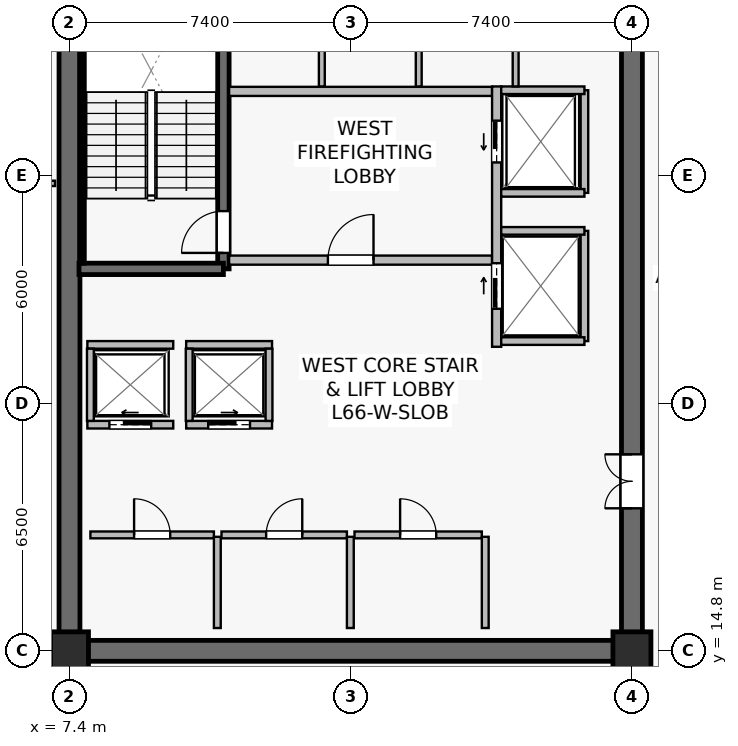
"""IFC4 building model, lengths in metres.
Left out: names, types, materials, properties, quantities, classifications, styles, units other than length and angle.
Written with IfcOpenShell. Run it as: python <this file> out.ifc"""

import sys

from ifc_helpers import new_model, si_unit, direction, frame, frame_2d, origin, origin_2d, place, context, subcontext, project, spatial, rectangle, extrude, source, transform, mapped, element, fill, save


model = new_model("IFC4")
c1 = context("Model", 3, precision=1e-05, world=origin(), true_north=direction((0.0, 1.0)))
c2 = subcontext(c1, "Body", "Model", "MODEL_VIEW")
j1 = project(units=[si_unit("LENGTHUNIT", "METRE"), si_unit("PLANEANGLEUNIT", "RADIAN")], contexts=[c1])
p1 = place(None, origin())
s1 = spatial("IfcSite", under=j1, at=p1, CompositionType="ELEMENT")
p2 = place(p1, origin())
s2 = spatial("IfcBuilding", under=s1, at=p2, CompositionType="ELEMENT")
p3 = place(p2, frame((0.0, 0.0, 275.2)))
s3 = spatial("IfcBuildingStorey", under=s2, at=p3, CompositionType="ELEMENT", Elevation=275.2)
p4 = place(p3, frame((7.125, 14.8, 0.0), z_axis=(0.0, 0.0, 1.0), x_axis=(1.0, 0.0, 0.0)))
e1 = element("IfcWall", 1, at=p4, inside=s3, PredefinedType="SHEAR", context=c2, shape_type="SweptSolid", body=[
    extrude(rectangle(XDim=15.35, YDim=0.55, at=frame_2d((7.675, 0.0))), origin(), (0.0, 0.0, 1.0), 3.8),
])
p5 = place(p3, frame((7.4, 15.075, 0.0), z_axis=(0.0, 0.0, 1.0), x_axis=(0.0, 1.0, 0.0)))
e2 = element("IfcWall", 2, at=p5, inside=s3, PredefinedType="SHEAR", context=c2, shape_type="SweptSolid", body=[
    extrude(rectangle(XDim=18.45, YDim=0.55, at=frame_2d((9.225, 0.0))), origin(), (0.0, 0.0, 1.0), 3.8),
])
p6 = place(p3, frame((22.2, 15.075, 0.0), z_axis=(0.0, 0.0, 1.0), x_axis=(0.0, 1.0, 0.0)))
e3 = element("IfcWall", 3, at=p6, inside=s3, PredefinedType="SHEAR", context=c2, shape_type="SweptSolid", body=[
    extrude(rectangle(XDim=18.45, YDim=0.55, at=frame_2d((9.225, 0.0))), origin(), (0.0, 0.0, 1.0), 3.8),
])
p7 = place(p6, frame((3.475, 0.0, 0.0)))
e4 = element("IfcOpeningElement", 4, at=p7, cuts=e3, PredefinedType="OPENING", context=c2, shape_type="SweptSolid", body=[
    extrude(rectangle(XDim=1.42, YDim=2.2, at=frame_2d((0.71, 1.1))), frame((0.0, 0.285, 0.0), z_axis=(0.0, -1.0, 0.0), x_axis=(1.0, 0.0, 0.0)), (0.0, 0.0, 1.0), 0.57),
])
p8 = place(p3, frame((11.45, 24.85, 0.0), z_axis=(0.0, 0.0, 1.0), x_axis=(0.0, 1.0, 0.0)))
e5 = element("IfcWall", 5, at=p8, inside=s3, PredefinedType="SHEAR", context=c2, shape_type="SweptSolid", body=[
    extrude(rectangle(XDim=8.63, YDim=0.3, at=frame_2d((4.315, 0.0))), origin(), (0.0, 0.0, 1.0), 3.8),
])
p9 = place(p8, frame((0.42, 0.0, 0.0)))
e6 = element("IfcOpeningElement", 6, at=p9, cuts=e5, PredefinedType="OPENING", context=c2, shape_type="SweptSolid", body=[
    extrude(rectangle(XDim=1.1, YDim=2.15, at=frame_2d((0.55, 1.075))), frame((0.0, 0.16, 0.0), z_axis=(0.0, -1.0, 0.0), x_axis=(1.0, 0.0, 0.0)), (0.0, 0.0, 1.0), 0.32),
])
p10 = place(p3, frame((7.65, 24.85, 0.0), z_axis=(0.0, 0.0, 1.0), x_axis=(1.0, 0.0, 0.0)))
e7 = element("IfcWall", 7, at=p10, inside=s3, PredefinedType="SHEAR", context=c2, shape_type="SweptSolid", body=[
    extrude(rectangle(XDim=3.8, YDim=0.3, at=frame_2d((1.9, 0.0))), origin(), (0.0, 0.0, 1.0), 3.8),
])
p11 = place(p3, frame((7.73, 25.0, 0.0), z_axis=(0.0, 0.0, 1.0), x_axis=(0.0, 1.0, 0.0)))
e8 = element("IfcWall", 8, at=p11, inside=s3, PredefinedType="SOLIDWALL", context=c2, shape_type="SweptSolid", body=[
    extrude(rectangle(XDim=8.32, YDim=0.12, at=frame_2d((4.16, 0.0))), origin(), (0.0, 0.0, 1.0), 3.8),
])
m1 = source(origin(), c2, "Body", "SweptSolid", [
    extrude(rectangle(XDim=1.0, YDim=1.0, at=origin_2d()), origin(), (0.0, 0.0, 1.0), 4.1),
])
for number, where, z_axis, x_axis in (
    (9, (7.4, 14.8, 0.0), (0.0, 0.0, 1.0), (1.0, 0.0, 0.0)),
    (10, (22.2, 14.8, 0.0), (0.0, 0.0, 1.0), (1.0, 0.0, 0.0)),
):
    element("IfcColumn", number, at=place(p3, frame(where, z_axis=z_axis, x_axis=x_axis)), inside=s3, PredefinedType="COLUMN", context=c2, shape_type="MappedRepresentation", body=[
        mapped(m1, transform((0.0, 0.0, 0.0), scale=1.0)),
    ])
p12 = place(p3, frame((11.6, 25.08, 0.0), z_axis=(0.0, 0.0, 1.0), x_axis=(1.0, 0.0, 0.0)))
e11 = element("IfcWall", 11, at=p12, inside=s3, PredefinedType="SOLIDWALL", context=c2, shape_type="SweptSolid", body=[
    extrude(rectangle(XDim=6.92, YDim=0.24, at=frame_2d((3.46, 0.0))), origin(), (0.0, 0.0, 1.0), 3.197),
])
p13 = place(p12, frame((2.6, 0.0, 0.0)))
e12 = element("IfcOpeningElement", 12, at=p13, cuts=e11, PredefinedType="OPENING", context=c2, shape_type="SweptSolid", body=[
    extrude(rectangle(XDim=1.2, YDim=2.16, at=frame_2d((0.6, 1.08))), frame((0.0, 0.13, 0.0), z_axis=(0.0, -1.0, 0.0), x_axis=(1.0, 0.0, 0.0)), (0.0, 0.0, 1.0), 0.26),
])
p14 = place(p3, frame((11.6, 29.52, 0.0), z_axis=(0.0, 0.0, 1.0), x_axis=(1.0, 0.0, 0.0)))
e13 = element("IfcWall", 13, at=p14, inside=s3, PredefinedType="SOLIDWALL", context=c2, shape_type="SweptSolid", body=[
    extrude(rectangle(XDim=6.92, YDim=0.24, at=frame_2d((3.46, 0.0))), origin(), (0.0, 0.0, 1.0), 3.197),
])
p15 = place(p3, frame((18.64, 22.8, 0.0), z_axis=(0.0, 0.0, 1.0), x_axis=(0.0, 1.0, 0.0)))
e14 = element("IfcWall", 14, at=p15, inside=s3, PredefinedType="SOLIDWALL", context=c2, shape_type="SweptSolid", body=[
    extrude(rectangle(XDim=6.85, YDim=0.24, at=frame_2d((3.425, 0.0))), origin(), (0.0, 0.0, 1.0), 2.935),
])
p16 = place(p15, frame((4.85, 0.0, 0.0)))
e15 = element("IfcOpeningElement", 15, at=p16, cuts=e14, PredefinedType="OPENING", context=c2, shape_type="SweptSolid", body=[
    extrude(rectangle(XDim=1.1, YDim=2.22, at=frame_2d((0.55, 1.11))), frame((0.0, 0.13, 0.0), z_axis=(0.0, -1.0, 0.0), x_axis=(1.0, 0.0, 0.0)), (0.0, 0.0, 1.0), 0.26),
])
p17 = place(p15, frame((1.0, 0.0, 0.0)))
e16 = element("IfcOpeningElement", 16, at=p17, cuts=e14, PredefinedType="OPENING", context=c2, shape_type="SweptSolid", body=[
    extrude(rectangle(XDim=1.2, YDim=2.22, at=frame_2d((0.6, 1.11))), frame((0.0, 0.13, 0.0), z_axis=(0.0, -1.0, 0.0), x_axis=(1.0, 0.0, 0.0)), (0.0, 0.0, 1.0), 0.26),
])
p18 = place(p3, frame((7.87, 20.75, 0.0), z_axis=(0.0, 0.0, 1.0), x_axis=(1.0, 0.0, 0.0)))
e17 = element("IfcWall", 17, at=p18, inside=s3, PredefinedType="SOLIDWALL", context=c2, shape_type="SweptSolid", body=[
    extrude(rectangle(XDim=2.26, YDim=0.2, at=frame_2d((1.13, 0.0))), origin(), (0.0, 0.0, 1.0), 3.8),
])
p19 = place(p18, frame((0.58, 0.0, 0.0)))
e18 = element("IfcOpeningElement", 18, at=p19, cuts=e17, PredefinedType="OPENING", context=c2, shape_type="SweptSolid", body=[
    extrude(rectangle(XDim=1.1, YDim=2.22, at=frame_2d((0.55, 1.11))), frame((0.0, 0.11, 0.0), z_axis=(0.0, -1.0, 0.0), x_axis=(1.0, 0.0, 0.0)), (0.0, 0.0, 1.0), 0.22),
])
p20 = place(p3, frame((7.87, 22.85, 0.0), z_axis=(0.0, 0.0, 1.0), x_axis=(1.0, 0.0, 0.0)))
e19 = element("IfcWall", 19, at=p20, inside=s3, PredefinedType="SOLIDWALL", context=c2, shape_type="SweptSolid", body=[
    extrude(rectangle(XDim=2.26, YDim=0.2, at=frame_2d((1.13, 0.0))), origin(), (0.0, 0.0, 1.0), 3.8),
])
p21 = place(p3, frame((7.95, 20.85, 0.0), z_axis=(0.0, 0.0, 1.0), x_axis=(0.0, 1.0, 0.0)))
e20 = element("IfcWall", 20, at=p21, inside=s3, PredefinedType="SOLIDWALL", context=c2, shape_type="SweptSolid", body=[
    extrude(rectangle(XDim=1.9, YDim=0.18, at=frame_2d((0.95, 0.0))), origin(), (0.0, 0.0, 1.0), 3.8),
])
p22 = place(p3, frame((10.47, 20.75, 0.0), z_axis=(0.0, 0.0, 1.0), x_axis=(1.0, 0.0, 0.0)))
e21 = element("IfcWall", 21, at=p22, inside=s3, PredefinedType="SOLIDWALL", context=c2, shape_type="SweptSolid", body=[
    extrude(rectangle(XDim=2.26, YDim=0.2, at=frame_2d((1.13, 0.0))), origin(), (0.0, 0.0, 1.0), 3.8),
])
p23 = place(p22, frame((0.58, 0.0, 0.0)))
e22 = element("IfcOpeningElement", 22, at=p23, cuts=e21, PredefinedType="OPENING", context=c2, shape_type="SweptSolid", body=[
    extrude(rectangle(XDim=1.1, YDim=2.22, at=frame_2d((0.55, 1.11))), frame((0.0, 0.11, 0.0), z_axis=(0.0, -1.0, 0.0), x_axis=(1.0, 0.0, 0.0)), (0.0, 0.0, 1.0), 0.22),
])
p24 = place(p3, frame((10.47, 22.85, 0.0), z_axis=(0.0, 0.0, 1.0), x_axis=(1.0, 0.0, 0.0)))
e23 = element("IfcWall", 23, at=p24, inside=s3, PredefinedType="SOLIDWALL", context=c2, shape_type="SweptSolid", body=[
    extrude(rectangle(XDim=2.26, YDim=0.2, at=frame_2d((1.13, 0.0))), origin(), (0.0, 0.0, 1.0), 3.8),
])
for number, where, z_axis, x_axis in (
    (24, (10.55, 20.85, 0.0), (0.0, 0.0, 1.0), (0.0, 1.0, 0.0)),
    (25, (12.65, 20.85, 0.0), (0.0, 0.0, 1.0), (0.0, 1.0, 0.0)),
):
    element("IfcWall", number, at=place(p3, frame(where, z_axis=z_axis, x_axis=x_axis)), inside=s3, PredefinedType="SOLIDWALL", context=c2, shape_type="SweptSolid", body=[
        extrude(rectangle(XDim=1.9, YDim=0.18, at=frame_2d((0.95, 0.0))), origin(), (0.0, 0.0, 1.0), 3.8),
    ])
p25 = place(p3, frame((20.95, 26.85, 0.0), z_axis=(0.0, 0.0, 1.0), x_axis=(0.0, 1.0, 0.0)))
e26 = element("IfcWall", 26, at=p25, inside=s3, PredefinedType="SOLIDWALL", context=c2, shape_type="SweptSolid", body=[
    extrude(rectangle(XDim=2.7, YDim=0.2, at=frame_2d((1.35, 0.0))), origin(), (0.0, 0.0, 1.0), 3.8),
])
p26 = place(p3, frame((18.76, 29.55, 0.0), z_axis=(0.0, 0.0, 1.0), x_axis=(1.0, 0.0, 0.0)))
e27 = element("IfcWall", 27, at=p26, inside=s3, PredefinedType="SOLIDWALL", context=c2, shape_type="SweptSolid", body=[
    extrude(rectangle(XDim=2.19, YDim=0.2, at=frame_2d((1.095, 0.0))), origin(), (0.0, 0.0, 1.0), 3.8),
])
p27 = place(p3, frame((18.76, 26.85, 0.0), z_axis=(0.0, 0.0, 1.0), x_axis=(1.0, 0.0, 0.0)))
e28 = element("IfcWall", 28, at=p27, inside=s3, PredefinedType="SOLIDWALL", context=c2, shape_type="SweptSolid", body=[
    extrude(rectangle(XDim=2.19, YDim=0.2, at=frame_2d((1.095, 0.0))), origin(), (0.0, 0.0, 1.0), 3.197),
])
p28 = place(p3, frame((20.95, 22.95, 0.0), z_axis=(0.0, 0.0, 1.0), x_axis=(0.0, 1.0, 0.0)))
e29 = element("IfcWall", 29, at=p28, inside=s3, PredefinedType="SOLIDWALL", context=c2, shape_type="SweptSolid", body=[
    extrude(rectangle(XDim=2.9, YDim=0.2, at=frame_2d((1.45, 0.0))), origin(), (0.0, 0.0, 1.0), 2.935),
])
for number, where, z_axis, x_axis in (
    (30, (18.76, 25.85, 0.0), (0.0, 0.0, 1.0), (1.0, 0.0, 0.0)),
    (31, (18.76, 22.95, 0.0), (0.0, 0.0, 1.0), (1.0, 0.0, 0.0)),
):
    element("IfcWall", number, at=place(p3, frame(where, z_axis=z_axis, x_axis=x_axis)), inside=s3, PredefinedType="SOLIDWALL", context=c2, shape_type="SweptSolid", body=[
        extrude(rectangle(XDim=2.19, YDim=0.2, at=frame_2d((1.095, 0.0))), origin(), (0.0, 0.0, 1.0), 3.8),
    ])
p29 = place(p3, frame((7.95, 17.85, 0.0), z_axis=(0.0, 0.0, 1.0), x_axis=(1.0, 0.0, 0.0)))
e32 = element("IfcWall", 32, at=p29, inside=s3, PredefinedType="SOLIDWALL", context=c2, shape_type="SweptSolid", body=[
    extrude(rectangle(XDim=3.25, YDim=0.18, at=frame_2d((1.625, 0.0))), origin(), (0.0, 0.0, 1.0), 3.8),
])
p30 = place(p29, frame((1.15, 0.0, 0.0)))
e33 = element("IfcOpeningElement", 33, at=p30, cuts=e32, PredefinedType="OPENING", context=c2, shape_type="SweptSolid", body=[
    extrude(rectangle(XDim=0.95, YDim=2.15, at=frame_2d((0.475, 1.075))), frame((0.0, 0.1, 0.0), z_axis=(0.0, -1.0, 0.0), x_axis=(1.0, 0.0, 0.0)), (0.0, 0.0, 1.0), 0.2),
])
p31 = place(p3, frame((11.29, 15.4, 0.0), z_axis=(0.0, 0.0, 1.0), x_axis=(0.0, 1.0, 0.0)))
e34 = element("IfcWall", 34, at=p31, inside=s3, PredefinedType="SOLIDWALL", context=c2, shape_type="SweptSolid", body=[
    extrude(rectangle(XDim=2.4, YDim=0.18, at=frame_2d((1.2, 0.0))), origin(), (0.0, 0.0, 1.0), 3.8),
])
p32 = place(p3, frame((11.4, 17.85, 0.0), z_axis=(0.0, 0.0, 1.0), x_axis=(1.0, 0.0, 0.0)))
e35 = element("IfcWall", 35, at=p32, inside=s3, PredefinedType="SOLIDWALL", context=c2, shape_type="SweptSolid", body=[
    extrude(rectangle(XDim=3.3, YDim=0.18, at=frame_2d((1.65, 0.0))), origin(), (0.0, 0.0, 1.0), 3.197),
])
p33 = place(p32, frame((1.175, 0.0, 0.0)))
e36 = element("IfcOpeningElement", 36, at=p33, cuts=e35, PredefinedType="OPENING", context=c2, shape_type="SweptSolid", body=[
    extrude(rectangle(XDim=0.95, YDim=2.15, at=frame_2d((0.475, 1.075))), frame((0.0, 0.1, 0.0), z_axis=(0.0, -1.0, 0.0), x_axis=(1.0, 0.0, 0.0)), (0.0, 0.0, 1.0), 0.2),
])
p34 = place(p3, frame((14.79, 15.4, 0.0), z_axis=(0.0, 0.0, 1.0), x_axis=(0.0, 1.0, 0.0)))
e37 = element("IfcWall", 37, at=p34, inside=s3, PredefinedType="SOLIDWALL", context=c2, shape_type="SweptSolid", body=[
    extrude(rectangle(XDim=2.4, YDim=0.18, at=frame_2d((1.2, 0.0))), origin(), (0.0, 0.0, 1.0), 3.197),
])
p35 = place(p3, frame((14.9, 17.85, 0.0), z_axis=(0.0, 0.0, 1.0), x_axis=(1.0, 0.0, 0.0)))
e38 = element("IfcWall", 38, at=p35, inside=s3, PredefinedType="SOLIDWALL", context=c2, shape_type="SweptSolid", body=[
    extrude(rectangle(XDim=3.35, YDim=0.18, at=frame_2d((1.675, 0.0))), origin(), (0.0, 0.0, 1.0), 3.197),
])
p36 = place(p35, frame((1.2, 0.0, 0.0)))
e39 = element("IfcOpeningElement", 39, at=p36, cuts=e38, PredefinedType="OPENING", context=c2, shape_type="SweptSolid", body=[
    extrude(rectangle(XDim=0.95, YDim=2.15, at=frame_2d((0.475, 1.075))), frame((0.0, 0.1, 0.0), z_axis=(0.0, -1.0, 0.0), x_axis=(1.0, 0.0, 0.0)), (0.0, 0.0, 1.0), 0.2),
])
p37 = place(p3, frame((18.34, 15.4, 0.0), z_axis=(0.0, 0.0, 1.0), x_axis=(0.0, 1.0, 0.0)))
e40 = element("IfcWall", 40, at=p37, inside=s3, PredefinedType="SOLIDWALL", context=c2, shape_type="SweptSolid", body=[
    extrude(rectangle(XDim=2.4, YDim=0.18, at=frame_2d((1.2, 0.0))), origin(), (0.0, 0.0, 1.0), 3.8),
])
for number, where, z_axis, x_axis in (
    (41, (14.04, 29.65, 0.0), (0.0, 0.0, 1.0), (0.0, 1.0, 0.0)),
    (42, (16.59, 29.65, 0.0), (0.0, 0.0, 1.0), (0.0, 1.0, 0.0)),
    (43, (19.14, 29.65, 0.0), (0.0, 0.0, 1.0), (0.0, 1.0, 0.0)),
):
    element("IfcWall", number, at=place(p3, frame(where, z_axis=z_axis, x_axis=x_axis)), inside=s3, PredefinedType="PLUMBINGWALL", context=c2, shape_type="SweptSolid", body=[
        extrude(rectangle(XDim=3.93, YDim=0.155, at=frame_2d((1.965, 0.0))), origin(), (0.0, 0.0, 1.0), 3.8),
    ])
p38 = place(p3, frame((4.11, 27.1, 0.0), z_axis=(0.0, 0.0, 1.0), x_axis=(1.0, 0.0, 0.0)))
e44 = element("IfcWall", 44, at=p38, inside=s3, PredefinedType="PARTITIONING", context=c2, shape_type="SweptSolid", body=[
    extrude(rectangle(XDim=2.91, YDim=0.14, at=frame_2d((1.455, 0.0))), origin(), (0.0, 0.0, 1.0), 3.8),
])
p39 = place(p3, frame((4.11, 14.505, 0.0), z_axis=(0.0, 0.0, 1.0), x_axis=(1.0, 0.0, 0.0)))
e45 = element("IfcWall", 45, at=p39, inside=s3, PredefinedType="PARTITIONING", context=c2, shape_type="SweptSolid", body=[
    extrude(rectangle(XDim=2.91, YDim=0.14, at=frame_2d((1.455, 0.0))), origin(), (0.0, 0.0, 1.0), 3.8),
])
p40 = place(p39, frame((1.005, 0.0, 0.0)))
e46 = element("IfcOpeningElement", 46, at=p40, cuts=e45, PredefinedType="OPENING", context=c2, shape_type="SweptSolid", body=[
    extrude(rectangle(XDim=0.9, YDim=2.1, at=frame_2d((0.45, 1.05))), frame((0.0, 0.08, 0.0), z_axis=(0.0, -1.0, 0.0), x_axis=(1.0, 0.0, 0.0)), (0.0, 0.0, 1.0), 0.16),
])
m2 = source(origin(), c2, "Body", "SweptSolid", [
    extrude(rectangle(XDim=1.1, YDim=2.15, at=frame_2d((0.55, 1.075))), frame((0.0, 0.025, 0.0), z_axis=(0.0, -1.0, 0.0), x_axis=(1.0, 0.0, 0.0)), (0.0, 0.0, 1.0), 0.05),
])
p41 = place(p9, origin())
e47 = element("IfcDoor", 47, at=p41, inside=s3, OperationType="SINGLE_SWING_LEFT", PredefinedType="DOOR", context=c2, shape_type="MappedRepresentation", body=[
    mapped(m2, transform((0.0, 0.0, 0.0), scale=1.0)),
])
fill(e6, e47)
m3 = source(origin(), c2, "Body", "SweptSolid", [
    extrude(rectangle(XDim=1.2, YDim=2.16, at=frame_2d((0.6, 1.08))), frame((0.0, 0.025, 0.0), z_axis=(0.0, -1.0, 0.0), x_axis=(1.0, 0.0, 0.0)), (0.0, 0.0, 1.0), 0.05),
])
p42 = place(p13, origin())
e48 = element("IfcDoor", 48, at=p42, inside=s3, OperationType="SINGLE_SWING_RIGHT", PredefinedType="DOOR", context=c2, shape_type="MappedRepresentation", body=[
    mapped(m3, transform((0.0, 0.0, 0.0), scale=1.0)),
])
fill(e12, e48)
m4 = source(origin(), c2, "Body", "SweptSolid", [
    extrude(rectangle(XDim=1.1, YDim=2.22, at=frame_2d((0.55, 1.11))), frame((0.0, 0.025, 0.0), z_axis=(0.0, -1.0, 0.0), x_axis=(1.0, 0.0, 0.0)), (0.0, 0.0, 1.0), 0.05),
])
p43 = place(p19, origin())
e49 = element("IfcDoor", 49, at=p43, inside=s3, OperationType="SLIDING_TO_LEFT", PredefinedType="USERDEFINED", context=c2, shape_type="MappedRepresentation", body=[
    mapped(m4, transform((0.0, 0.0, 0.0), scale=1.0)),
])
fill(e18, e49)
p44 = place(p23, origin())
e50 = element("IfcDoor", 50, at=p44, inside=s3, OperationType="SLIDING_TO_RIGHT", PredefinedType="USERDEFINED", context=c2, shape_type="MappedRepresentation", body=[
    mapped(m4, transform((0.0, 0.0, 0.0), scale=1.0)),
])
fill(e22, e50)
p45 = place(p16, origin())
e51 = element("IfcDoor", 51, at=p45, inside=s3, OperationType="SLIDING_TO_LEFT", PredefinedType="USERDEFINED", context=c2, shape_type="MappedRepresentation", body=[
    mapped(m4, transform((0.0, 0.0, 0.0), scale=1.0)),
])
fill(e15, e51)
m5 = source(origin(), c2, "Body", "SweptSolid", [
    extrude(rectangle(XDim=1.2, YDim=2.22, at=frame_2d((0.6, 1.11))), frame((0.0, 0.025, 0.0), z_axis=(0.0, -1.0, 0.0), x_axis=(1.0, 0.0, 0.0)), (0.0, 0.0, 1.0), 0.05),
])
p46 = place(p17, origin())
e52 = element("IfcDoor", 52, at=p46, inside=s3, OperationType="SLIDING_TO_RIGHT", PredefinedType="USERDEFINED", context=c2, shape_type="MappedRepresentation", body=[
    mapped(m5, transform((0.0, 0.0, 0.0), scale=1.0)),
])
fill(e16, e52)
m6 = source(origin(), c2, "Body", "SweptSolid", [
    extrude(rectangle(XDim=0.95, YDim=2.15, at=frame_2d((0.475, 1.075))), frame((0.0, 0.025, 0.0), z_axis=(0.0, -1.0, 0.0), x_axis=(1.0, 0.0, 0.0)), (0.0, 0.0, 1.0), 0.05),
])
p47 = place(p30, origin())
e53 = element("IfcDoor", 53, at=p47, inside=s3, OperationType="SINGLE_SWING_LEFT", PredefinedType="DOOR", context=c2, shape_type="MappedRepresentation", body=[
    mapped(m6, transform((0.0, 0.0, 0.0), scale=1.0)),
])
fill(e33, e53)
p48 = place(p33, origin())
e54 = element("IfcDoor", 54, at=p48, inside=s3, OperationType="SINGLE_SWING_RIGHT", PredefinedType="DOOR", context=c2, shape_type="MappedRepresentation", body=[
    mapped(m6, transform((0.0, 0.0, 0.0), scale=1.0)),
])
fill(e36, e54)
p49 = place(p36, origin())
e55 = element("IfcDoor", 55, at=p49, inside=s3, OperationType="SINGLE_SWING_LEFT", PredefinedType="DOOR", context=c2, shape_type="MappedRepresentation", body=[
    mapped(m6, transform((0.0, 0.0, 0.0), scale=1.0)),
])
fill(e39, e55)
m7 = source(origin(), c2, "Body", "SweptSolid", [
    extrude(rectangle(XDim=1.42, YDim=2.2, at=frame_2d((0.71, 1.1))), frame((0.0, 0.025, 0.0), z_axis=(0.0, -1.0, 0.0), x_axis=(1.0, 0.0, 0.0)), (0.0, 0.0, 1.0), 0.05),
])
p50 = place(p7, origin())
e56 = element("IfcDoor", 56, at=p50, inside=s3, OperationType="DOUBLE_DOOR_SINGLE_SWING", PredefinedType="DOOR", context=c2, shape_type="MappedRepresentation", body=[
    mapped(m7, transform((0.0, 0.0, 0.0), scale=1.0)),
])
fill(e4, e56)
save(model, sys.argv[1])
